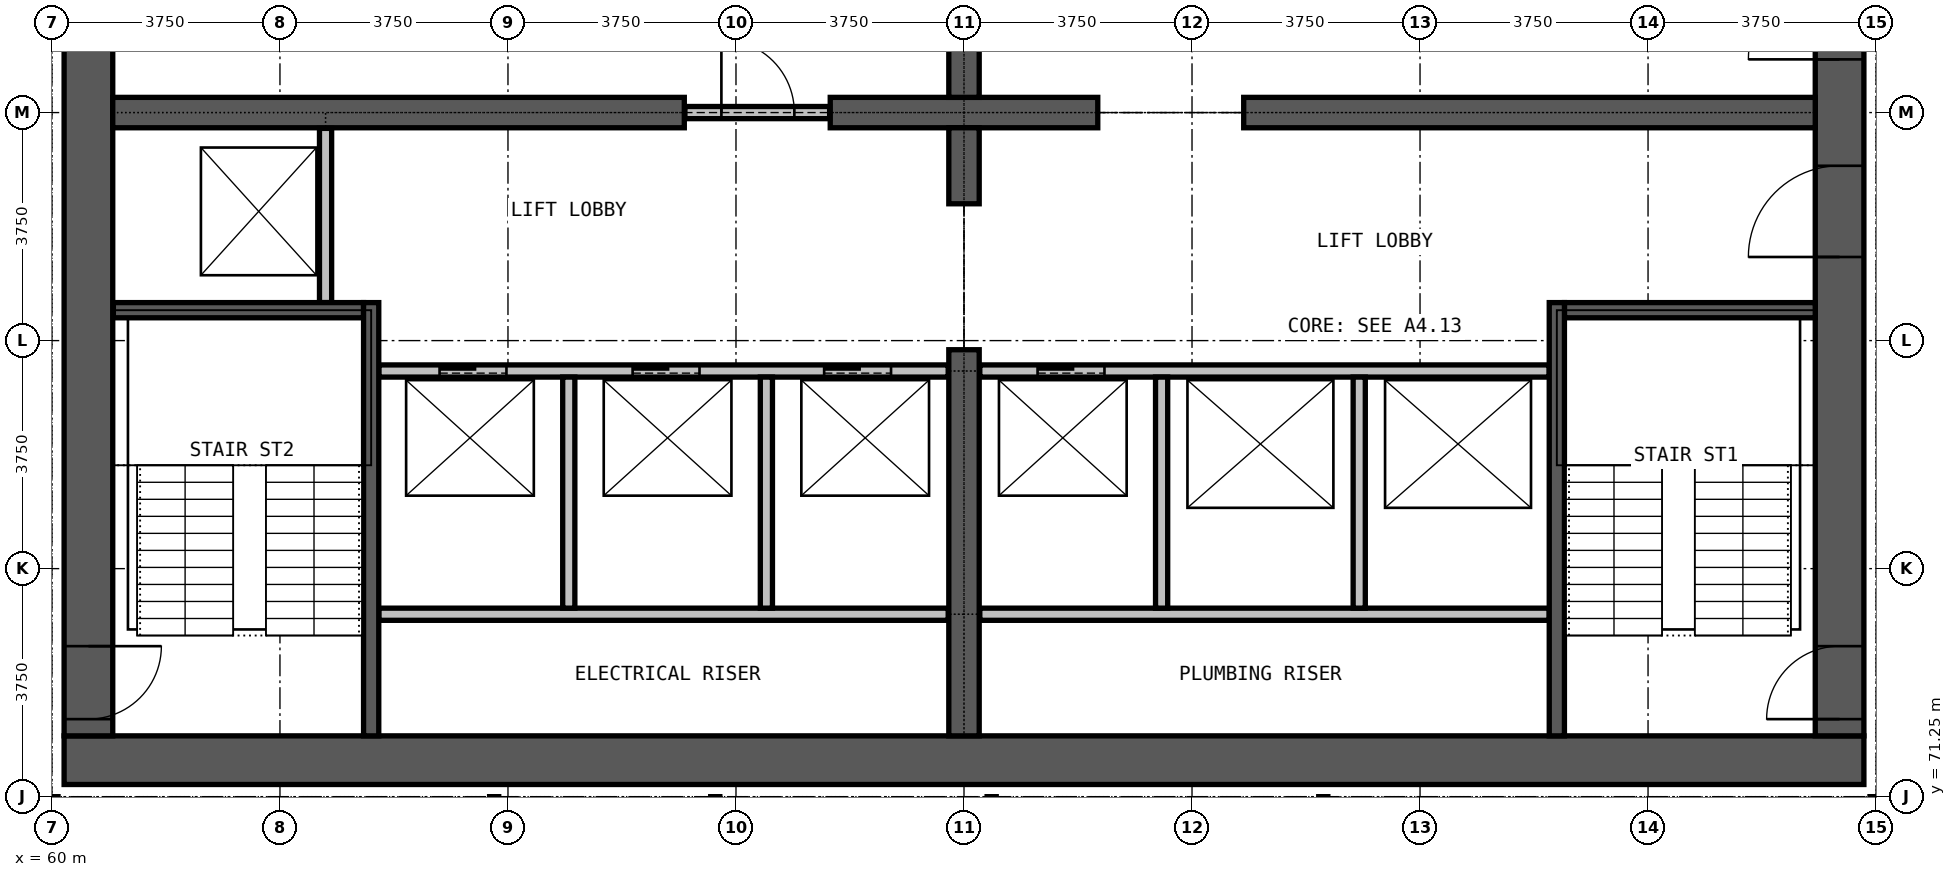
"""IFC4 building model, lengths in metres.
Left out: names, types, materials, properties, quantities, classifications, styles, units other than length and angle.
Written with IfcOpenShell. Run it as: python <this file> out.ifc"""

import sys

from ifc_helpers import new_model, si_unit, direction, frame, frame_2d, origin, place, context, subcontext, project, spatial, rectangle, extrude, element, fill, save


model = new_model("IFC4")
c1 = context("Model", 3, precision=1e-05, world=origin(), true_north=direction((0.0, 1.0)))
c2 = subcontext(c1, "Body", "Model", "MODEL_VIEW")
j1 = project(units=[si_unit("LENGTHUNIT", "METRE"), si_unit("PLANEANGLEUNIT", "RADIAN")], contexts=[c1])
p1 = place(None, origin())
s1 = spatial("IfcSite", under=j1, at=p1, CompositionType="ELEMENT")
p2 = place(p1, origin())
s2 = spatial("IfcBuilding", under=s1, at=p2, CompositionType="ELEMENT")
p3 = place(p2, frame((0.0, 0.0, 132.4)))
s3 = spatial("IfcBuildingStorey", under=s2, at=p3, CompositionType="ELEMENT", Elevation=132.4)
p4 = place(p3, frame((60.2, 71.85, 0.0), z_axis=(0.0, 0.0, 1.0), x_axis=(1.0, 0.0, 0.0)))
e1 = element("IfcWall", 1, at=p4, inside=s3, PredefinedType="SHEAR", context=c2, shape_type="SweptSolid", body=[
    extrude(rectangle(XDim=29.6, YDim=0.8, at=frame_2d((14.8, 0.0))), origin(), (0.0, 0.0, 1.0), 3.6),
])
p5 = place(p3, frame((89.4, 72.25, 0.0), z_axis=(0.0, 0.0, 1.0), x_axis=(0.0, 1.0, 0.0)))
e2 = element("IfcWall", 2, at=p5, inside=s3, PredefinedType="SHEAR", context=c2, shape_type="SweptSolid", body=[
    extrude(rectangle(XDim=20.5, YDim=0.8, at=frame_2d((10.25, 0.0))), origin(), (0.0, 0.0, 1.0), 3.6),
])
p6 = place(p5, frame((0.275, 0.0, 0.0)))
e3 = element("IfcOpeningElement", 3, at=p6, cuts=e2, PredefinedType="OPENING", context=c2, shape_type="SweptSolid", body=[
    extrude(rectangle(XDim=1.2, YDim=2.2, at=frame_2d((0.6, 1.1))), frame((0.0, 0.41, 0.0), z_axis=(0.0, -1.0, 0.0), x_axis=(1.0, 0.0, 0.0)), (0.0, 0.0, 1.0), 0.82),
])
p7 = place(p5, frame((13.775, 0.0, 0.0)))
e4 = element("IfcOpeningElement", 4, at=p7, cuts=e2, PredefinedType="OPENING", context=c2, shape_type="SweptSolid", body=[
    extrude(rectangle(XDim=1.2, YDim=2.2, at=frame_2d((0.6, 1.1))), frame((0.0, 0.41, 0.0), z_axis=(0.0, -1.0, 0.0), x_axis=(1.0, 0.0, 0.0)), (0.0, 0.0, 1.0), 0.82),
])
p8 = place(p5, frame((7.875, 0.0, 0.0)))
e5 = element("IfcOpeningElement", 5, at=p8, cuts=e2, PredefinedType="OPENING", context=c2, shape_type="SweptSolid", body=[
    extrude(rectangle(XDim=1.5, YDim=2.2, at=frame_2d((0.75, 1.1))), frame((0.0, 0.41, 0.0), z_axis=(0.0, -1.0, 0.0), x_axis=(1.0, 0.0, 0.0)), (0.0, 0.0, 1.0), 0.82),
])
p9 = place(p5, frame((11.125, 0.0, 0.0)))
e6 = element("IfcOpeningElement", 6, at=p9, cuts=e2, PredefinedType="OPENING", context=c2, shape_type="SweptSolid", body=[
    extrude(rectangle(XDim=1.5, YDim=2.2, at=frame_2d((0.75, 1.1))), frame((0.0, 0.41, 0.0), z_axis=(0.0, -1.0, 0.0), x_axis=(1.0, 0.0, 0.0)), (0.0, 0.0, 1.0), 0.82),
])
p10 = place(p3, frame((60.6, 92.75, 0.0), z_axis=(0.0, 0.0, 1.0), x_axis=(0.0, -1.0, 0.0)))
e7 = element("IfcWall", 7, at=p10, inside=s3, PredefinedType="SHEAR", context=c2, shape_type="SweptSolid", body=[
    extrude(rectangle(XDim=20.5, YDim=0.8, at=frame_2d((10.25, 0.0))), origin(), (0.0, 0.0, 1.0), 3.6),
])
p11 = place(p10, frame((19.025, 0.0, 0.0)))
e8 = element("IfcOpeningElement", 8, at=p11, cuts=e7, PredefinedType="OPENING", context=c2, shape_type="SweptSolid", body=[
    extrude(rectangle(XDim=1.2, YDim=2.2, at=frame_2d((0.6, 1.1))), frame((0.0, 0.41, 0.0), z_axis=(0.0, -1.0, 0.0), x_axis=(1.0, 0.0, 0.0)), (0.0, 0.0, 1.0), 0.82),
])
p12 = place(p10, frame((8.025, 0.0, 0.0)))
e9 = element("IfcOpeningElement", 9, at=p12, cuts=e7, PredefinedType="OPENING", context=c2, shape_type="SweptSolid", body=[
    extrude(rectangle(XDim=1.2, YDim=2.2, at=frame_2d((0.6, 1.1))), frame((0.0, 0.41, 0.0), z_axis=(0.0, -1.0, 0.0), x_axis=(1.0, 0.0, 0.0)), (0.0, 0.0, 1.0), 0.82),
])
p13 = place(p3, frame((61.0, 82.5, 0.0), z_axis=(0.0, 0.0, 1.0), x_axis=(1.0, 0.0, 0.0)))
e10 = element("IfcWall", 10, at=p13, inside=s3, PredefinedType="SHEAR", context=c2, shape_type="SweptSolid", body=[
    extrude(rectangle(XDim=9.4, YDim=0.5, at=frame_2d((4.7, 0.0))), origin(), (0.0, 0.0, 1.0), 3.6),
])
p14 = place(p3, frame((72.8, 82.5, 0.0), z_axis=(0.0, 0.0, 1.0), x_axis=(1.0, 0.0, 0.0)))
e11 = element("IfcWall", 11, at=p14, inside=s3, PredefinedType="SHEAR", context=c2, shape_type="SweptSolid", body=[
    extrude(rectangle(XDim=4.4, YDim=0.5, at=frame_2d((2.2, 0.0))), origin(), (0.0, 0.0, 1.0), 3.6),
])
p15 = place(p3, frame((79.6, 82.5, 0.0), z_axis=(0.0, 0.0, 1.0), x_axis=(1.0, 0.0, 0.0)))
e12 = element("IfcWall", 12, at=p15, inside=s3, PredefinedType="SHEAR", context=c2, shape_type="SweptSolid", body=[
    extrude(rectangle(XDim=9.4, YDim=0.5, at=frame_2d((4.7, 0.0))), origin(), (0.0, 0.0, 1.0), 3.6),
])
p16 = place(p3, frame((75.0, 72.25, 0.0), z_axis=(0.0, 0.0, 1.0), x_axis=(0.0, 1.0, 0.0)))
e13 = element("IfcWall", 13, at=p16, inside=s3, PredefinedType="SHEAR", context=c2, shape_type="SweptSolid", body=[
    extrude(rectangle(XDim=6.35, YDim=0.5, at=frame_2d((3.175, 0.0))), origin(), (0.0, 0.0, 1.0), 3.6),
])
for number, where, z_axis, x_axis in (
    (14, (75.0, 81.0, 0.0), (0.0, 0.0, 1.0), (0.0, 1.0, 0.0)),
    (15, (75.0, 82.75, 0.0), (0.0, 0.0, 1.0), (0.0, 1.0, 0.0)),
):
    element("IfcWall", number, at=place(p3, frame(where, z_axis=z_axis, x_axis=x_axis)), inside=s3, PredefinedType="SHEAR", context=c2, shape_type="SweptSolid", body=[
        extrude(rectangle(XDim=1.25, YDim=0.5, at=frame_2d((0.625, 0.0))), origin(), (0.0, 0.0, 1.0), 3.6),
    ])
p17 = place(p3, frame((70.41, 82.5, 0.0), z_axis=(0.0, 0.0, 1.0), x_axis=(1.0, 0.0, 0.0)))
e16 = element("IfcWall", 16, at=p17, inside=s3, PredefinedType="PARTITIONING", context=c2, shape_type="SweptSolid", body=[
    extrude(rectangle(XDim=2.38, YDim=0.2, at=frame_2d((1.19, 0.0))), origin(), (0.0, 0.0, 1.0), 2.4),
])
p18 = place(p17, frame((0.6, 0.0, 0.0)))
e17 = element("IfcOpeningElement", 17, at=p18, cuts=e16, PredefinedType="OPENING", context=c2, shape_type="SweptSolid", body=[
    extrude(rectangle(XDim=1.2, YDim=2.2, at=frame_2d((0.6, 1.1))), frame((0.0, 0.11, 0.0), z_axis=(0.0, -1.0, 0.0), x_axis=(1.0, 0.0, 0.0)), (0.0, 0.0, 1.0), 0.22),
])
for number, where, z_axis, x_axis in (
    (18, (65.375, 74.25, 0.0), (0.0, 0.0, 1.0), (1.0, 0.0, 0.0)),
    (19, (75.26, 74.25, 0.0), (0.0, 0.0, 1.0), (1.0, 0.0, 0.0)),
):
    element("IfcWall", number, at=place(p3, frame(where, z_axis=z_axis, x_axis=x_axis)), inside=s3, PredefinedType="PARTITIONING", context=c2, shape_type="SweptSolid", body=[
        extrude(rectangle(XDim=9.365, YDim=0.2, at=frame_2d((4.683, 0.0))), origin(), (0.0, 0.0, 1.0), 3.3),
    ])
p19 = place(p3, frame((65.375, 78.25, 0.0), z_axis=(0.0, 0.0, 1.0), x_axis=(1.0, 0.0, 0.0)))
e20 = element("IfcWall", 20, at=p19, inside=s3, PredefinedType="PARTITIONING", context=c2, shape_type="SweptSolid", body=[
    extrude(rectangle(XDim=9.365, YDim=0.2, at=frame_2d((4.683, 0.0))), origin(), (0.0, 0.0, 1.0), 3.3),
])
p20 = place(p19, frame((1.0, 0.0, 0.0)))
e21 = element("IfcOpeningElement", 21, at=p20, cuts=e20, PredefinedType="OPENING", context=c2, shape_type="SweptSolid", body=[
    extrude(rectangle(XDim=1.1, YDim=2.2, at=frame_2d((0.55, 1.1))), frame((0.0, 0.11, 0.0), z_axis=(0.0, -1.0, 0.0), x_axis=(1.0, 0.0, 0.0)), (0.0, 0.0, 1.0), 0.22),
])
p21 = place(p19, frame((4.175, 0.0, 0.0)))
e22 = element("IfcOpeningElement", 22, at=p21, cuts=e20, PredefinedType="OPENING", context=c2, shape_type="SweptSolid", body=[
    extrude(rectangle(XDim=1.1, YDim=2.2, at=frame_2d((0.55, 1.1))), frame((0.0, 0.11, 0.0), z_axis=(0.0, -1.0, 0.0), x_axis=(1.0, 0.0, 0.0)), (0.0, 0.0, 1.0), 0.22),
])
p22 = place(p19, frame((7.325, 0.0, 0.0)))
e23 = element("IfcOpeningElement", 23, at=p22, cuts=e20, PredefinedType="OPENING", context=c2, shape_type="SweptSolid", body=[
    extrude(rectangle(XDim=1.1, YDim=2.2, at=frame_2d((0.55, 1.1))), frame((0.0, 0.11, 0.0), z_axis=(0.0, -1.0, 0.0), x_axis=(1.0, 0.0, 0.0)), (0.0, 0.0, 1.0), 0.22),
])
p23 = place(p3, frame((75.26, 78.25, 0.0), z_axis=(0.0, 0.0, 1.0), x_axis=(1.0, 0.0, 0.0)))
e24 = element("IfcWall", 24, at=p23, inside=s3, PredefinedType="PARTITIONING", context=c2, shape_type="SweptSolid", body=[
    extrude(rectangle(XDim=9.365, YDim=0.2, at=frame_2d((4.683, 0.0))), origin(), (0.0, 0.0, 1.0), 3.3),
])
p24 = place(p23, frame((0.95, 0.0, 0.0)))
e25 = element("IfcOpeningElement", 25, at=p24, cuts=e24, PredefinedType="OPENING", context=c2, shape_type="SweptSolid", body=[
    extrude(rectangle(XDim=1.1, YDim=2.2, at=frame_2d((0.55, 1.1))), frame((0.0, 0.11, 0.0), z_axis=(0.0, -1.0, 0.0), x_axis=(1.0, 0.0, 0.0)), (0.0, 0.0, 1.0), 0.22),
])
p25 = place(p3, frame((64.5, 79.375, 0.0), z_axis=(0.0, 0.0, 1.0), x_axis=(0.0, 1.0, 0.0)))
e26 = element("IfcWall", 26, at=p25, inside=s3, PredefinedType="PARTITIONING", context=c2, shape_type="SweptSolid", body=[
    extrude(rectangle(XDim=2.865, YDim=0.2, at=frame_2d((1.433, 0.0))), origin(), (0.0, 0.0, 1.0), 3.3),
])
for number, where, z_axis, x_axis in (
    (27, (68.5, 74.35, 0.0), (0.0, 0.0, 1.0), (0.0, 1.0, 0.0)),
    (28, (71.75, 74.35, 0.0), (0.0, 0.0, 1.0), (0.0, 1.0, 0.0)),
    (29, (78.25, 74.35, 0.0), (0.0, 0.0, 1.0), (0.0, 1.0, 0.0)),
    (30, (81.5, 74.35, 0.0), (0.0, 0.0, 1.0), (0.0, 1.0, 0.0)),
):
    element("IfcWall", number, at=place(p3, frame(where, z_axis=z_axis, x_axis=x_axis)), inside=s3, PredefinedType="PARTITIONING", context=c2, shape_type="SweptSolid", body=[
        extrude(rectangle(XDim=3.8, YDim=0.2, at=frame_2d((1.9, 0.0))), origin(), (0.0, 0.0, 1.0), 3.3),
    ])
p26 = place(p3, frame((61.01, 79.25, 0.0), z_axis=(0.0, 0.0, 1.0), x_axis=(1.0, 0.0, 0.0)))
e31 = element("IfcWall", 31, at=p26, inside=s3, PredefinedType="PARTITIONING", context=c2, shape_type="SweptSolid", body=[
    extrude(rectangle(XDim=4.115, YDim=0.25, at=frame_2d((2.058, 0.0))), origin(), (0.0, 0.0, 1.0), 3.3),
])
p27 = place(p3, frame((84.875, 79.25, 0.0), z_axis=(0.0, 0.0, 1.0), x_axis=(1.0, 0.0, 0.0)))
e32 = element("IfcWall", 32, at=p27, inside=s3, PredefinedType="PARTITIONING", context=c2, shape_type="SweptSolid", body=[
    extrude(rectangle(XDim=4.125, YDim=0.25, at=frame_2d((2.062, 0.0))), origin(), (0.0, 0.0, 1.0), 3.3),
])
for number, where, z_axis, x_axis in (
    (33, (65.25, 72.25, 0.0), (0.0, 0.0, 1.0), (0.0, 1.0, 0.0)),
    (34, (84.75, 72.25, 0.0), (0.0, 0.0, 1.0), (0.0, 1.0, 0.0)),
):
    element("IfcWall", number, at=place(p3, frame(where, z_axis=z_axis, x_axis=x_axis)), inside=s3, PredefinedType="PARTITIONING", context=c2, shape_type="SweptSolid", body=[
        extrude(rectangle(XDim=7.125, YDim=0.25, at=frame_2d((3.562, 0.0))), origin(), (0.0, 0.0, 1.0), 3.3),
    ])
p28 = place(p20, origin())
e35 = element("IfcDoor", 35, at=p28, inside=s3, OperationType="DOUBLE_DOOR_SLIDING", PredefinedType="DOOR", context=c2, shape_type="SweptSolid", body=[
    extrude(rectangle(XDim=1.1, YDim=2.2, at=frame_2d((0.55, 1.1))), frame((0.0, 0.025, 0.0), z_axis=(0.0, -1.0, 0.0), x_axis=(1.0, 0.0, 0.0)), (0.0, 0.0, 1.0), 0.05),
])
fill(e21, e35)
p29 = place(p21, origin())
e36 = element("IfcDoor", 36, at=p29, inside=s3, OperationType="DOUBLE_DOOR_SLIDING", PredefinedType="DOOR", context=c2, shape_type="SweptSolid", body=[
    extrude(rectangle(XDim=1.1, YDim=2.2, at=frame_2d((0.55, 1.1))), frame((0.0, 0.025, 0.0), z_axis=(0.0, -1.0, 0.0), x_axis=(1.0, 0.0, 0.0)), (0.0, 0.0, 1.0), 0.05),
])
fill(e22, e36)
p30 = place(p22, origin())
e37 = element("IfcDoor", 37, at=p30, inside=s3, OperationType="DOUBLE_DOOR_SLIDING", PredefinedType="DOOR", context=c2, shape_type="SweptSolid", body=[
    extrude(rectangle(XDim=1.1, YDim=2.2, at=frame_2d((0.55, 1.1))), frame((0.0, 0.025, 0.0), z_axis=(0.0, -1.0, 0.0), x_axis=(1.0, 0.0, 0.0)), (0.0, 0.0, 1.0), 0.05),
])
fill(e23, e37)
p31 = place(p24, origin())
e38 = element("IfcDoor", 38, at=p31, inside=s3, OperationType="DOUBLE_DOOR_SLIDING", PredefinedType="DOOR", context=c2, shape_type="SweptSolid", body=[
    extrude(rectangle(XDim=1.1, YDim=2.2, at=frame_2d((0.55, 1.1))), frame((0.0, 0.025, 0.0), z_axis=(0.0, -1.0, 0.0), x_axis=(1.0, 0.0, 0.0)), (0.0, 0.0, 1.0), 0.05),
])
fill(e25, e38)
p32 = place(p18, origin())
e39 = element("IfcDoor", 39, at=p32, inside=s3, OperationType="SINGLE_SWING_RIGHT", PredefinedType="DOOR", context=c2, shape_type="SweptSolid", body=[
    extrude(rectangle(XDim=1.2, YDim=2.2, at=frame_2d((0.6, 1.1))), frame((0.0, 0.025, 0.0), z_axis=(0.0, -1.0, 0.0), x_axis=(1.0, 0.0, 0.0)), (0.0, 0.0, 1.0), 0.05),
])
fill(e17, e39)
p33 = place(p6, origin())
e40 = element("IfcDoor", 40, at=p33, inside=s3, OperationType="SINGLE_SWING_RIGHT", PredefinedType="DOOR", context=c2, shape_type="SweptSolid", body=[
    extrude(rectangle(XDim=1.2, YDim=2.2, at=frame_2d((0.6, 1.1))), frame((0.0, 0.025, 0.0), z_axis=(0.0, -1.0, 0.0), x_axis=(1.0, 0.0, 0.0)), (0.0, 0.0, 1.0), 0.05),
])
fill(e3, e40)
p34 = place(p11, origin())
e41 = element("IfcDoor", 41, at=p34, inside=s3, OperationType="SINGLE_SWING_LEFT", PredefinedType="DOOR", context=c2, shape_type="SweptSolid", body=[
    extrude(rectangle(XDim=1.2, YDim=2.2, at=frame_2d((0.6, 1.1))), frame((0.0, 0.025, 0.0), z_axis=(0.0, -1.0, 0.0), x_axis=(1.0, 0.0, 0.0)), (0.0, 0.0, 1.0), 0.05),
])
fill(e8, e41)
p35 = place(p8, origin())
e42 = element("IfcDoor", 42, at=p35, inside=s3, OperationType="DOUBLE_DOOR_SINGLE_SWING", PredefinedType="DOOR", context=c2, shape_type="SweptSolid", body=[
    extrude(rectangle(XDim=1.5, YDim=2.2, at=frame_2d((0.75, 1.1))), frame((0.0, 0.025, 0.0), z_axis=(0.0, -1.0, 0.0), x_axis=(1.0, 0.0, 0.0)), (0.0, 0.0, 1.0), 0.05),
])
fill(e5, e42)
p36 = place(p9, origin())
e43 = element("IfcDoor", 43, at=p36, inside=s3, OperationType="DOUBLE_DOOR_SINGLE_SWING", PredefinedType="DOOR", context=c2, shape_type="SweptSolid", body=[
    extrude(rectangle(XDim=1.5, YDim=2.2, at=frame_2d((0.75, 1.1))), frame((0.0, 0.025, 0.0), z_axis=(0.0, -1.0, 0.0), x_axis=(1.0, 0.0, 0.0)), (0.0, 0.0, 1.0), 0.05),
])
fill(e6, e43)
save(model, sys.argv[1])
